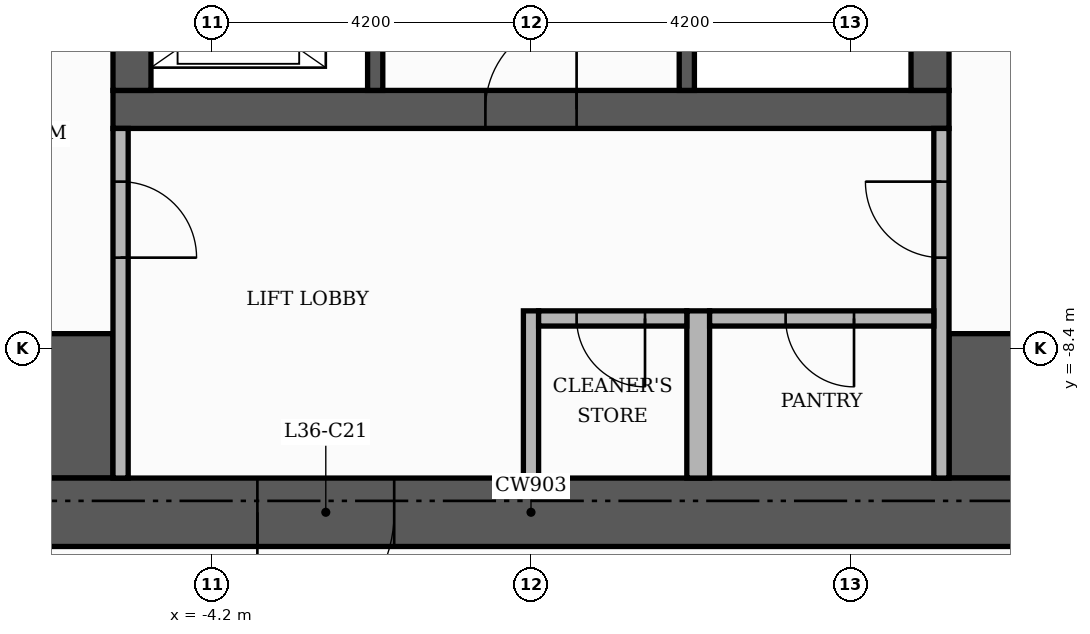
"""IFC4 building model, lengths in metres.
Left out: names, types, materials, properties, quantities, classifications, styles, units other than length and angle.
Written with IfcOpenShell. Run it as: python <this file> out.ifc"""

import sys

from ifc_helpers import new_model, si_unit, direction, frame, frame_2d, origin, place, context, subcontext, project, spatial, rectangle, extrude, element, fill, save


model = new_model("IFC4")
c1 = context("Model", 3, precision=1e-05, world=origin(), true_north=direction((0.0, 1.0)))
c2 = subcontext(c1, "Body", "Model", "MODEL_VIEW")
j1 = project(units=[si_unit("LENGTHUNIT", "METRE"), si_unit("PLANEANGLEUNIT", "RADIAN")], contexts=[c1])
p1 = place(None, origin())
s1 = spatial("IfcSite", under=j1, at=p1, CompositionType="ELEMENT")
p2 = place(p1, origin())
s2 = spatial("IfcBuilding", under=s1, at=p2, CompositionType="ELEMENT")
p3 = place(p2, frame((0.0, 0.0, 153.3)))
s3 = spatial("IfcBuildingStorey", under=s2, at=p3, CompositionType="ELEMENT", Elevation=153.3)
p4 = place(p3, frame((-5.5, -5.25, 0.0), z_axis=(0.0, 0.0, 1.0), x_axis=(1.0, 0.0, 0.0)))
e1 = element("IfcWall", 1, at=p4, inside=s3, PredefinedType="SHEAR", context=c2, shape_type="SweptSolid", body=[
    extrude(rectangle(XDim=11.0, YDim=0.5, at=frame_2d((5.5, 0.0))), origin(), (0.0, 0.0, 1.0), 3.48),
])
p5 = place(p4, frame((4.9, 0.0, 0.0)))
e2 = element("IfcOpeningElement", 2, at=p5, cuts=e1, PredefinedType="OPENING", context=c2, shape_type="SweptSolid", body=[
    extrude(rectangle(XDim=1.2, YDim=2.1, at=frame_2d((0.6, 1.05))), frame((0.0, 0.26, 0.0), z_axis=(0.0, -1.0, 0.0), x_axis=(1.0, 0.0, 0.0)), (0.0, 0.0, 1.0), 0.52),
])
for number, where, z_axis, x_axis in (
    (3, (-5.25, -5.0, 0.0), (0.0, 0.0, 1.0), (0.0, 1.0, 0.0)),
    (4, (5.25, -5.0, 0.0), (0.0, 0.0, 1.0), (0.0, 1.0, 0.0)),
):
    element("IfcWall", number, at=place(p3, frame(where, z_axis=z_axis, x_axis=x_axis)), inside=s3, PredefinedType="SHEAR", context=c2, shape_type="SweptSolid", body=[
        extrude(rectangle(XDim=10.5, YDim=0.5, at=frame_2d((5.25, 0.0))), origin(), (0.0, 0.0, 1.0), 3.48),
    ])
for number, where, z_axis, x_axis in (
    (5, (-10.1, -9.15, 0.0), (0.0, 0.0, 1.0), (1.0, 0.0, 0.0)),
    (6, (5.5, -9.15, 0.0), (0.0, 0.0, 1.0), (1.0, 0.0, 0.0)),
):
    element("IfcWall", number, at=place(p3, frame(where, z_axis=z_axis, x_axis=x_axis)), inside=s3, PredefinedType="SHEAR", context=c2, shape_type="SweptSolid", body=[
        extrude(rectangle(XDim=4.6, YDim=1.9, at=frame_2d((2.3, 0.0))), origin(), (0.0, 0.0, 1.0), 3.48),
    ])
p6 = place(p3, frame((2.05, -5.0, 0.0), z_axis=(0.0, 0.0, 1.0), x_axis=(0.0, 1.0, 0.0)))
e7 = element("IfcWall", 7, at=p6, inside=s3, PredefinedType="SHEAR", context=c2, shape_type="SweptSolid", body=[
    extrude(rectangle(XDim=6.6, YDim=0.2, at=frame_2d((3.3, 0.0))), origin(), (0.0, 0.0, 1.0), 3.48),
])
p7 = place(p6, frame((5.25, 0.0, 0.0)))
e8 = element("IfcOpeningElement", 8, at=p7, cuts=e7, PredefinedType="OPENING", context=c2, shape_type="SweptSolid", body=[
    extrude(rectangle(XDim=1.0, YDim=2.1, at=frame_2d((0.5, 1.05))), frame((0.0, 0.11, 0.0), z_axis=(0.0, -1.0, 0.0), x_axis=(1.0, 0.0, 0.0)), (0.0, 0.0, 1.0), 0.22),
])
p8 = place(p3, frame((-2.05, -5.0, 0.0), z_axis=(0.0, 0.0, 1.0), x_axis=(0.0, 1.0, 0.0)))
e9 = element("IfcWall", 9, at=p8, inside=s3, PredefinedType="SHEAR", context=c2, shape_type="SweptSolid", body=[
    extrude(rectangle(XDim=3.4, YDim=0.2, at=frame_2d((1.7, 0.0))), origin(), (0.0, 0.0, 1.0), 3.48),
])
p9 = place(p8, frame((0.55, 0.0, 0.0)))
e10 = element("IfcOpeningElement", 10, at=p9, cuts=e9, PredefinedType="OPENING", context=c2, shape_type="SweptSolid", body=[
    extrude(rectangle(XDim=1.1, YDim=2.1, at=frame_2d((0.55, 1.05))), frame((0.0, 0.11, 0.0), z_axis=(0.0, -1.0, 0.0), x_axis=(1.0, 0.0, 0.0)), (0.0, 0.0, 1.0), 0.22),
])
p10 = place(p8, frame((2.45, 0.0, 0.0)))
e11 = element("IfcOpeningElement", 11, at=p10, cuts=e9, PredefinedType="OPENING", context=c2, shape_type="SweptSolid", body=[
    extrude(rectangle(XDim=0.8, YDim=2.1, at=frame_2d((0.4, 1.05))), frame((0.0, 0.11, 0.0), z_axis=(0.0, -1.0, 0.0), x_axis=(1.0, 0.0, 0.0)), (0.0, 0.0, 1.0), 0.22),
])
p11 = place(p3, frame((-11.0, -10.55, 0.0), z_axis=(0.0, 0.0, 1.0), x_axis=(1.0, 0.0, 0.0)))
e12 = element("IfcWall", 12, at=p11, inside=s3, PredefinedType="SHEAR", context=c2, shape_type="SweptSolid", body=[
    extrude(rectangle(XDim=22.0, YDim=0.9, at=frame_2d((11.0, 0.0))), origin(), (0.0, 0.0, 1.0), 3.48),
])
p12 = place(p11, frame((7.4, 0.0, 0.0)))
e13 = element("IfcOpeningElement", 13, at=p12, cuts=e12, PredefinedType="OPENING", context=c2, shape_type="SweptSolid", body=[
    extrude(rectangle(XDim=1.8, YDim=2.2, at=frame_2d((0.9, 1.1))), frame((0.0, 0.46, 0.0), z_axis=(0.0, -1.0, 0.0), x_axis=(1.0, 0.0, 0.0)), (0.0, 0.0, 1.0), 0.92),
])
p13 = place(p3, frame((-5.4, -10.1, 0.0), z_axis=(0.0, 0.0, 1.0), x_axis=(0.0, 1.0, 0.0)))
e14 = element("IfcWall", 14, at=p13, inside=s3, PredefinedType="PARTITIONING", context=c2, shape_type="SweptSolid", body=[
    extrude(rectangle(XDim=4.6, YDim=0.2, at=frame_2d((2.3, 0.0))), origin(), (0.0, 0.0, 1.0), 3.48),
])
p14 = place(p13, frame((2.9, 0.0, 0.0)))
e15 = element("IfcOpeningElement", 15, at=p14, cuts=e14, PredefinedType="OPENING", context=c2, shape_type="SweptSolid", body=[
    extrude(rectangle(XDim=1.0, YDim=2.1, at=frame_2d((0.5, 1.05))), frame((0.0, 0.11, 0.0), z_axis=(0.0, -1.0, 0.0), x_axis=(1.0, 0.0, 0.0)), (0.0, 0.0, 1.0), 0.22),
])
p15 = place(p3, frame((0.0, -10.1, 0.0), z_axis=(0.0, 0.0, 1.0), x_axis=(0.0, 1.0, 0.0)))
e16 = element("IfcWall", 16, at=p15, inside=s3, PredefinedType="PARTITIONING", context=c2, shape_type="SweptSolid", body=[
    extrude(rectangle(XDim=2.2, YDim=0.2, at=frame_2d((1.1, 0.0))), origin(), (0.0, 0.0, 1.0), 3.48),
])
p16 = place(p3, frame((2.2, -10.1, 0.0), z_axis=(0.0, 0.0, 1.0), x_axis=(0.0, 1.0, 0.0)))
e17 = element("IfcWall", 17, at=p16, inside=s3, PredefinedType="PARTITIONING", context=c2, shape_type="SweptSolid", body=[
    extrude(rectangle(XDim=2.2, YDim=0.3, at=frame_2d((1.1, 0.0))), origin(), (0.0, 0.0, 1.0), 3.48),
])
p17 = place(p3, frame((5.4, -10.1, 0.0), z_axis=(0.0, 0.0, 1.0), x_axis=(0.0, 1.0, 0.0)))
e18 = element("IfcWall", 18, at=p17, inside=s3, PredefinedType="PARTITIONING", context=c2, shape_type="SweptSolid", body=[
    extrude(rectangle(XDim=4.6, YDim=0.2, at=frame_2d((2.3, 0.0))), origin(), (0.0, 0.0, 1.0), 3.48),
])
p18 = place(p17, frame((2.9, 0.0, 0.0)))
e19 = element("IfcOpeningElement", 19, at=p18, cuts=e18, PredefinedType="OPENING", context=c2, shape_type="SweptSolid", body=[
    extrude(rectangle(XDim=1.0, YDim=2.1, at=frame_2d((0.5, 1.05))), frame((0.0, 0.11, 0.0), z_axis=(0.0, -1.0, 0.0), x_axis=(1.0, 0.0, 0.0)), (0.0, 0.0, 1.0), 0.22),
])
p19 = place(p3, frame((0.1, -8.0, 0.0), z_axis=(0.0, 0.0, 1.0), x_axis=(1.0, 0.0, 0.0)))
e20 = element("IfcWall", 20, at=p19, inside=s3, PredefinedType="PARTITIONING", context=c2, shape_type="SweptSolid", body=[
    extrude(rectangle(XDim=1.95, YDim=0.2, at=frame_2d((0.975, 0.0))), origin(), (0.0, 0.0, 1.0), 3.48),
])
p20 = place(p19, frame((0.5, 0.0, 0.0)))
e21 = element("IfcOpeningElement", 21, at=p20, cuts=e20, PredefinedType="OPENING", context=c2, shape_type="SweptSolid", body=[
    extrude(rectangle(XDim=0.9, YDim=2.1, at=frame_2d((0.45, 1.05))), frame((0.0, 0.11, 0.0), z_axis=(0.0, -1.0, 0.0), x_axis=(1.0, 0.0, 0.0)), (0.0, 0.0, 1.0), 0.22),
])
p21 = place(p3, frame((2.35, -8.0, 0.0), z_axis=(0.0, 0.0, 1.0), x_axis=(1.0, 0.0, 0.0)))
e22 = element("IfcWall", 22, at=p21, inside=s3, PredefinedType="PARTITIONING", context=c2, shape_type="SweptSolid", body=[
    extrude(rectangle(XDim=2.95, YDim=0.2, at=frame_2d((1.475, 0.0))), origin(), (0.0, 0.0, 1.0), 3.48),
])
p22 = place(p21, frame((1.0, 0.0, 0.0)))
e23 = element("IfcOpeningElement", 23, at=p22, cuts=e22, PredefinedType="OPENING", context=c2, shape_type="SweptSolid", body=[
    extrude(rectangle(XDim=0.9, YDim=2.1, at=frame_2d((0.45, 1.05))), frame((0.0, 0.11, 0.0), z_axis=(0.0, -1.0, 0.0), x_axis=(1.0, 0.0, 0.0)), (0.0, 0.0, 1.0), 0.22),
])
p23 = place(p5, origin())
e24 = element("IfcDoor", 24, at=p23, inside=s3, OperationType="SINGLE_SWING_RIGHT", PredefinedType="DOOR", context=c2, shape_type="SweptSolid", body=[
    extrude(rectangle(XDim=1.2, YDim=2.1, at=frame_2d((0.6, 1.05))), frame((0.0, 0.025, 0.0), z_axis=(0.0, -1.0, 0.0), x_axis=(1.0, 0.0, 0.0)), (0.0, 0.0, 1.0), 0.05),
])
fill(e2, e24)
p24 = place(p14, frame((1.0, 0.0, 0.0), z_axis=(0.0, 0.0, 1.0), x_axis=(-1.0, 0.0, 0.0)))
e25 = element("IfcDoor", 25, at=p24, inside=s3, OperationType="SINGLE_SWING_LEFT", PredefinedType="DOOR", context=c2, shape_type="SweptSolid", body=[
    extrude(rectangle(XDim=1.0, YDim=2.1, at=frame_2d((0.5, 1.05))), frame((0.0, 0.025, 0.0), z_axis=(0.0, -1.0, 0.0), x_axis=(1.0, 0.0, 0.0)), (0.0, 0.0, 1.0), 0.05),
])
fill(e15, e25)
p25 = place(p18, origin())
e26 = element("IfcDoor", 26, at=p25, inside=s3, OperationType="SINGLE_SWING_RIGHT", PredefinedType="DOOR", context=c2, shape_type="SweptSolid", body=[
    extrude(rectangle(XDim=1.0, YDim=2.1, at=frame_2d((0.5, 1.05))), frame((0.0, 0.025, 0.0), z_axis=(0.0, -1.0, 0.0), x_axis=(1.0, 0.0, 0.0)), (0.0, 0.0, 1.0), 0.05),
])
fill(e19, e26)
p26 = place(p12, frame((1.8, 0.0, 0.0), z_axis=(0.0, 0.0, 1.0), x_axis=(-1.0, 0.0, 0.0)))
e27 = element("IfcDoor", 27, at=p26, inside=s3, OperationType="DOUBLE_DOOR_SINGLE_SWING", PredefinedType="DOOR", context=c2, shape_type="SweptSolid", body=[
    extrude(rectangle(XDim=1.8, YDim=2.2, at=frame_2d((0.9, 1.1))), frame((0.0, 0.025, 0.0), z_axis=(0.0, -1.0, 0.0), x_axis=(1.0, 0.0, 0.0)), (0.0, 0.0, 1.0), 0.05),
])
fill(e13, e27)
p27 = place(p20, frame((0.9, 0.0, 0.0), z_axis=(0.0, 0.0, 1.0), x_axis=(-1.0, 0.0, 0.0)))
e28 = element("IfcDoor", 28, at=p27, inside=s3, OperationType="SINGLE_SWING_RIGHT", PredefinedType="DOOR", context=c2, shape_type="SweptSolid", body=[
    extrude(rectangle(XDim=0.9, YDim=2.1, at=frame_2d((0.45, 1.05))), frame((0.0, 0.025, 0.0), z_axis=(0.0, -1.0, 0.0), x_axis=(1.0, 0.0, 0.0)), (0.0, 0.0, 1.0), 0.05),
])
fill(e21, e28)
p28 = place(p22, frame((0.9, 0.0, 0.0), z_axis=(0.0, 0.0, 1.0), x_axis=(-1.0, 0.0, 0.0)))
e29 = element("IfcDoor", 29, at=p28, inside=s3, OperationType="SINGLE_SWING_RIGHT", PredefinedType="DOOR", context=c2, shape_type="SweptSolid", body=[
    extrude(rectangle(XDim=0.9, YDim=2.1, at=frame_2d((0.45, 1.05))), frame((0.0, 0.025, 0.0), z_axis=(0.0, -1.0, 0.0), x_axis=(1.0, 0.0, 0.0)), (0.0, 0.0, 1.0), 0.05),
])
fill(e23, e29)
save(model, sys.argv[1])
